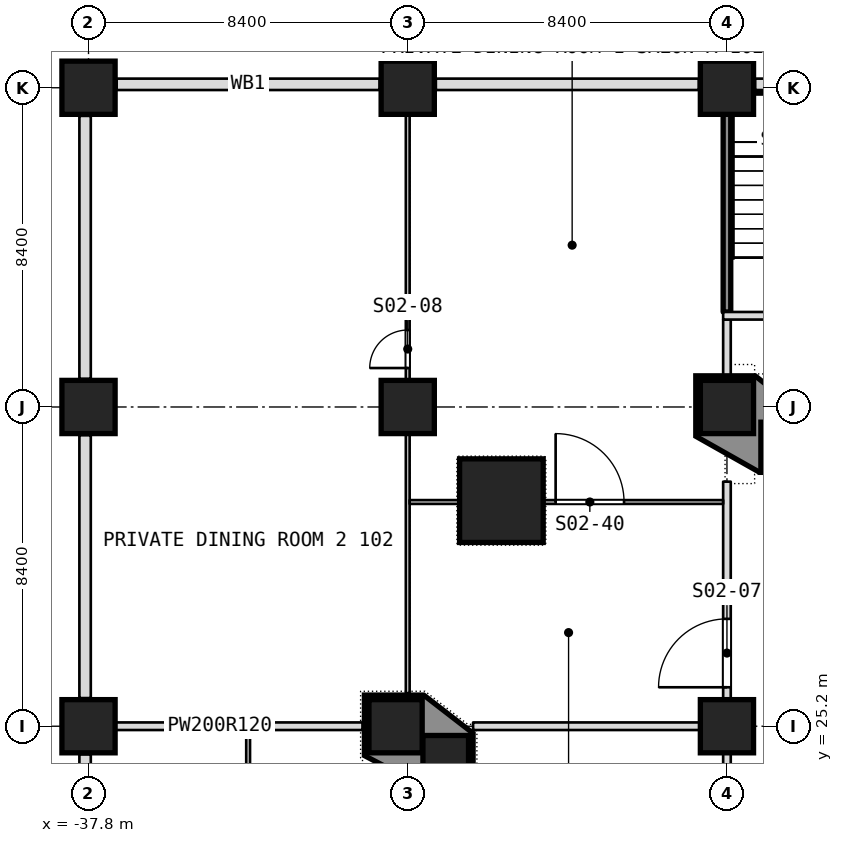
"""IFC4 building model, lengths in metres.
Left out: names, types, materials, properties, quantities, classifications, styles, units other than length and angle.
Written with IfcOpenShell. Run it as: python <this file> out.ifc"""

import sys

from ifc_helpers import new_model, si_unit, direction, frame, frame_2d, origin, origin_2d, place, context, subcontext, project, spatial, polyline, rectangle, outline, extrude, element, fill, save


model = new_model("IFC4")
c1 = context("Model", 3, precision=1e-05, world=origin(), true_north=direction((0.0, 1.0)))
c2 = subcontext(c1, "Body", "Model", "MODEL_VIEW")
j1 = project(units=[si_unit("LENGTHUNIT", "METRE"), si_unit("PLANEANGLEUNIT", "RADIAN")], contexts=[c1])
p1 = place(None, origin())
s1 = spatial("IfcSite", under=j1, at=p1, CompositionType="ELEMENT")
p2 = place(p1, origin())
s2 = spatial("IfcBuilding", under=s1, at=p2, CompositionType="ELEMENT")
p3 = place(p2, frame((0.0, 0.0, 8.0)))
s3 = spatial("IfcBuildingStorey", under=s2, at=p3, CompositionType="ELEMENT", Elevation=8.0)
for number, where, z_axis, x_axis in (
    (1, (-37.8, 25.2, 0.0), (0.0, 0.0, 1.0), (1.0, 0.0, 0.0)),
    (2, (-29.72, 25.2, 0.0), (0.0, 0.0, 1.0), (1.0, 0.0, 0.0)),
    (3, (-21.0, 25.2, 0.0), (0.0, 0.0, 1.0), (1.0, 0.0, 0.0)),
    (4, (-37.8, 33.6, 0.0), (0.0, 0.0, 1.0), (1.0, 0.0, 0.0)),
    (5, (-29.4, 33.6, 0.0), (0.0, 0.0, 1.0), (1.0, 0.0, 0.0)),
    (6, (-21.0, 33.6, 0.0), (0.0, 0.0, 1.0), (1.0, 0.0, 0.0)),
    (7, (-37.8, 42.0, 0.0), (0.0, 0.0, 1.0), (1.0, 0.0, 0.0)),
    (8, (-29.4, 42.0, 0.0), (0.0, 0.0, 1.0), (1.0, 0.0, 0.0)),
    (9, (-21.0, 42.0, 0.0), (0.0, 0.0, 1.0), (1.0, 0.0, 0.0)),
):
    element("IfcColumn", number, at=place(p3, frame(where, z_axis=z_axis, x_axis=x_axis)), inside=s3, PredefinedType="COLUMN", context=c2, shape_type="SweptSolid", body=[
        extrude(rectangle(XDim=1.4, YDim=1.4, at=origin_2d()), origin(), (0.0, 0.0, 1.0), 5.0),
    ])
p4 = place(p3, frame((-26.936, 31.135, 0.0), z_axis=(0.0, 0.0, 1.0), x_axis=(1.0, 0.0, 0.0)))
e10 = element("IfcColumn", 10, at=p4, inside=s3, PredefinedType="COLUMN", context=c2, shape_type="SweptSolid", body=[
    extrude(rectangle(XDim=2.2, YDim=2.2, at=origin_2d()), origin(), (0.0, 0.0, 1.0), 5.0),
])
for number, where, z_axis, x_axis in (
    (11, (-28.4, 24.356, 0.0), (0.0, 0.0, 1.0), (1.0, 0.0, 0.0)),
    (12, (-19.507, 32.6, 0.0), (0.0, 0.0, 1.0), (1.0, 0.0, 0.0)),
):
    element("IfcColumn", number, at=place(p3, frame(where, z_axis=z_axis, x_axis=x_axis)), inside=s3, PredefinedType="COLUMN", context=c2, shape_type="SweptSolid", body=[
        extrude(rectangle(XDim=1.2, YDim=1.2, at=origin_2d()), origin(), (0.0, 0.0, 1.0), 5.0),
    ])
p5 = place(p3, frame((-21.0, 9.5, 0.0), z_axis=(0.0, 0.0, 1.0), x_axis=(0.0, 1.0, 0.0)))
e13 = element("IfcWall", 13, at=p5, inside=s3, PredefinedType="PARTITIONING", context=c2, shape_type="SweptSolid", body=[
    extrude(rectangle(XDim=22.135, YDim=0.2, at=frame_2d((11.067, 0.0))), origin(), (0.0, 0.0, 1.0), 4.68),
])
p6 = place(p5, frame((8.325, 0.0, 0.0)))
e14 = element("IfcOpeningElement", 14, at=p6, cuts=e13, PredefinedType="OPENING", context=c2, shape_type="SweptSolid", body=[
    extrude(rectangle(XDim=1.8, YDim=2.1, at=frame_2d((0.9, 1.05))), frame((0.0, 0.1, 0.0), z_axis=(0.0, -1.0, 0.0), x_axis=(1.0, 0.0, 0.0)), (0.0, 0.0, 1.0), 0.2),
])
p7 = place(p5, frame((2.875, 0.0, 0.0)))
e15 = element("IfcOpeningElement", 15, at=p7, cuts=e13, PredefinedType="OPENING", context=c2, shape_type="SweptSolid", body=[
    extrude(rectangle(XDim=1.8, YDim=2.1, at=frame_2d((0.9, 1.05))), frame((0.0, 0.1, 0.0), z_axis=(0.0, -1.0, 0.0), x_axis=(1.0, 0.0, 0.0)), (0.0, 0.0, 1.0), 0.2),
])
p8 = place(p5, frame((16.725, 0.0, 0.0)))
e16 = element("IfcOpeningElement", 16, at=p8, cuts=e13, PredefinedType="OPENING", context=c2, shape_type="SweptSolid", body=[
    extrude(rectangle(XDim=1.8, YDim=2.1, at=frame_2d((0.9, 1.05))), frame((0.0, 0.1, 0.0), z_axis=(0.0, -1.0, 0.0), x_axis=(1.0, 0.0, 0.0)), (0.0, 0.0, 1.0), 0.2),
])
p9 = place(p3, frame((-21.0, 34.42, 0.0), z_axis=(0.0, 0.0, 1.0), x_axis=(0.0, 1.0, 0.0)))
e17 = element("IfcWall", 17, at=p9, inside=s3, PredefinedType="PARTITIONING", context=c2, shape_type="SweptSolid", body=[
    extrude(rectangle(XDim=1.48, YDim=0.2, at=frame_2d((0.74, 0.0))), origin(), (0.0, 0.0, 1.0), 4.68),
])
p10 = place(p3, frame((-21.0, 36.1, 0.0), z_axis=(0.0, 0.0, 1.0), x_axis=(0.0, 1.0, 0.0)))
e18 = element("IfcWall", 18, at=p10, inside=s3, PredefinedType="PARTITIONING", context=c2, shape_type="SweptSolid", body=[
    extrude(rectangle(XDim=6.2, YDim=0.2, at=frame_2d((3.1, 0.0))), origin(), (0.0, 0.0, 1.0), 4.68),
])
p11 = place(p3, frame((-38.1, 25.2, 0.0), z_axis=(0.0, 0.0, 1.0), x_axis=(1.0, 0.0, 0.0)))
e19 = element("IfcWall", 19, at=p11, inside=s3, PredefinedType="PARTITIONING", context=c2, shape_type="SweptSolid", body=[
    extrude(rectangle(XDim=7.51, YDim=0.2, at=frame_2d((3.755, 0.0))), origin(), (0.0, 0.0, 1.0), 4.68),
])
p12 = place(p3, frame((-27.68, 25.2, 0.0), z_axis=(0.0, 0.0, 1.0), x_axis=(1.0, 0.0, 0.0)))
e20 = element("IfcWall", 20, at=p12, inside=s3, PredefinedType="PARTITIONING", context=c2, shape_type="SweptSolid", body=[
    extrude(rectangle(XDim=6.58, YDim=0.2, at=frame_2d((3.29, 0.0))), origin(), (0.0, 0.0, 1.0), 4.68),
])
p13 = place(p3, frame((-29.4, 26.07, 0.0), z_axis=(0.0, 0.0, 1.0), x_axis=(0.0, 1.0, 0.0)))
e21 = element("IfcWall", 21, at=p13, inside=s3, PredefinedType="PARTITIONING", context=c2, shape_type="SweptSolid", body=[
    extrude(rectangle(XDim=16.23, YDim=0.1, at=frame_2d((8.115, 0.0))), origin(), (0.0, 0.0, 1.0), 4.68),
])
p14 = place(p13, frame((8.555, 0.0, 0.0)))
e22 = element("IfcOpeningElement", 22, at=p14, cuts=e21, PredefinedType="OPENING", context=c2, shape_type="SweptSolid", body=[
    extrude(rectangle(XDim=1.0, YDim=2.1, at=frame_2d((0.5, 1.05))), frame((0.0, 0.05, 0.0), z_axis=(0.0, -1.0, 0.0), x_axis=(1.0, 0.0, 0.0)), (0.0, 0.0, 1.0), 0.1),
])
p15 = place(p3, frame((-29.35, 31.1, 0.0), z_axis=(0.0, 0.0, 1.0), x_axis=(1.0, 0.0, 0.0)))
e23 = element("IfcWall", 23, at=p15, inside=s3, PredefinedType="PARTITIONING", context=c2, shape_type="SweptSolid", body=[
    extrude(rectangle(XDim=1.294, YDim=0.1, at=frame_2d((0.647, 0.0))), origin(), (0.0, 0.0, 1.0), 4.68),
])
p16 = place(p3, frame((-25.816, 31.1, 0.0), z_axis=(0.0, 0.0, 1.0), x_axis=(1.0, 0.0, 0.0)))
e24 = element("IfcWall", 24, at=p16, inside=s3, PredefinedType="PARTITIONING", context=c2, shape_type="SweptSolid", body=[
    extrude(rectangle(XDim=4.716, YDim=0.1, at=frame_2d((2.358, 0.0))), origin(), (0.0, 0.0, 1.0), 4.68),
])
p17 = place(p16, frame((0.308, 0.0, 0.0)))
e25 = element("IfcOpeningElement", 25, at=p17, cuts=e24, PredefinedType="OPENING", context=c2, shape_type="SweptSolid", body=[
    extrude(rectangle(XDim=1.8, YDim=2.1, at=frame_2d((0.9, 1.05))), frame((0.0, 0.05, 0.0), z_axis=(0.0, -1.0, 0.0), x_axis=(1.0, 0.0, 0.0)), (0.0, 0.0, 1.0), 0.1),
])
p18 = place(p3, frame((-33.6, 15.7, 0.0), z_axis=(0.0, 0.0, 1.0), x_axis=(0.0, 1.0, 0.0)))
e26 = element("IfcWall", 26, at=p18, inside=s3, PredefinedType="PARTITIONING", context=c2, shape_type="SweptSolid", body=[
    extrude(rectangle(XDim=9.4, YDim=0.1, at=frame_2d((4.7, 0.0))), origin(), (0.0, 0.0, 1.0), 4.68),
])
p19 = place(p18, frame((4.775, 0.0, 0.0)))
e27 = element("IfcOpeningElement", 27, at=p19, cuts=e26, PredefinedType="OPENING", context=c2, shape_type="SweptSolid", body=[
    extrude(rectangle(XDim=1.2, YDim=2.1, at=frame_2d((0.6, 1.05))), frame((0.0, 0.05, 0.0), z_axis=(0.0, -1.0, 0.0), x_axis=(1.0, 0.0, 0.0)), (0.0, 0.0, 1.0), 0.1),
])
p20 = place(p3, frame((-21.1, 36.0, 0.0), z_axis=(0.0, 0.0, 1.0), x_axis=(1.0, 0.0, 0.0)))
e28 = element("IfcWall", 28, at=p20, inside=s3, PredefinedType="PARTITIONING", context=c2, shape_type="SweptSolid", body=[
    extrude(rectangle(XDim=23.3, YDim=0.2, at=frame_2d((11.65, 0.0))), origin(), (0.0, 0.0, 1.0), 4.68),
])
p21 = place(p20, frame((1.6, 0.0, 0.0)))
e29 = element("IfcOpeningElement", 29, at=p21, cuts=e28, PredefinedType="OPENING", context=c2, shape_type="SweptSolid", body=[
    extrude(rectangle(XDim=1.2, YDim=2.1, at=frame_2d((0.6, 1.05))), frame((0.0, 0.1, 0.0), z_axis=(0.0, -1.0, 0.0), x_axis=(1.0, 0.0, 0.0)), (0.0, 0.0, 1.0), 0.2),
])
p22 = place(p20, frame((11.15, 0.0, 0.0)))
e30 = element("IfcOpeningElement", 30, at=p22, cuts=e28, PredefinedType="OPENING", context=c2, shape_type="SweptSolid", body=[
    extrude(rectangle(XDim=1.0, YDim=2.1, at=frame_2d((0.5, 1.05))), frame((0.0, 0.1, 0.0), z_axis=(0.0, -1.0, 0.0), x_axis=(1.0, 0.0, 0.0)), (0.0, 0.0, 1.0), 0.2),
])
p23 = place(p20, frame((10.05, 0.0, 0.0)))
e31 = element("IfcOpeningElement", 31, at=p23, cuts=e28, PredefinedType="OPENING", context=c2, shape_type="SweptSolid", body=[
    extrude(rectangle(XDim=1.0, YDim=2.1, at=frame_2d((0.5, 1.05))), frame((0.0, 0.1, 0.0), z_axis=(0.0, -1.0, 0.0), x_axis=(1.0, 0.0, 0.0)), (0.0, 0.0, 1.0), 0.2),
])
p24 = place(p20, frame((20.5, 0.0, 0.0)))
e32 = element("IfcOpeningElement", 32, at=p24, cuts=e28, PredefinedType="OPENING", context=c2, shape_type="SweptSolid", body=[
    extrude(rectangle(XDim=1.2, YDim=2.1, at=frame_2d((0.6, 1.05))), frame((0.0, 0.1, 0.0), z_axis=(0.0, -1.0, 0.0), x_axis=(1.0, 0.0, 0.0)), (0.0, 0.0, 1.0), 0.2),
])
for number, where, z_axis, x_axis in (
    (33, (-13.34, 42.09, 0.0), (0.0, 0.0, 1.0), (-1.0, 0.0, 0.0)),
    (34, (-21.74, 42.09, 0.0), (0.0, 0.0, 1.0), (-1.0, 0.0, 0.0)),
):
    element("IfcWall", number, at=place(p3, frame(where, z_axis=z_axis, x_axis=x_axis)), inside=s3, PredefinedType="NOTDEFINED", context=c2, shape_type="SweptSolid", body=[
        extrude(rectangle(XDim=6.92, YDim=0.3, at=frame_2d((3.46, 0.0))), origin(), (0.0, 0.0, 1.0), 3.78),
    ])
p25 = place(p3, frame((-30.14, 42.09, 0.0), z_axis=(0.0, 0.0, 1.0), x_axis=(-1.0, 0.0, 0.0)))
e35 = element("IfcWall", 35, at=p25, inside=s3, PredefinedType="NOTDEFINED", context=c2, shape_type="SweptSolid", body=[
    extrude(rectangle(XDim=6.92, YDim=0.3, at=frame_2d((3.46, 0.0))), origin(), (0.0, 0.0, 1.0), 3.78),
])
p26 = place(p3, frame((-37.89, 41.26, 0.0), z_axis=(0.0, 0.0, 1.0), x_axis=(0.0, -1.0, 0.0)))
e36 = element("IfcWall", 36, at=p26, inside=s3, PredefinedType="NOTDEFINED", context=c2, shape_type="SweptSolid", body=[
    extrude(rectangle(XDim=6.92, YDim=0.3, at=frame_2d((3.46, 0.0))), origin(), (0.0, 0.0, 1.0), 3.78),
])
p27 = place(p3, frame((-37.89, 32.86, 0.0), z_axis=(0.0, 0.0, 1.0), x_axis=(0.0, -1.0, 0.0)))
e37 = element("IfcWall", 37, at=p27, inside=s3, PredefinedType="NOTDEFINED", context=c2, shape_type="SweptSolid", body=[
    extrude(rectangle(XDim=6.92, YDim=0.3, at=frame_2d((3.46, 0.0))), origin(), (0.0, 0.0, 1.0), 3.78),
])
p28 = place(p3, frame((-37.89, 24.46, 0.0), z_axis=(0.0, 0.0, 1.0), x_axis=(0.0, -1.0, 0.0)))
e38 = element("IfcWall", 38, at=p28, inside=s3, PredefinedType="NOTDEFINED", context=c2, shape_type="SweptSolid", body=[
    extrude(rectangle(XDim=6.92, YDim=0.3, at=frame_2d((3.46, 0.0))), origin(), (0.0, 0.0, 1.0), 3.78),
])
p29 = place(p3, origin())
e39 = element("IfcWall", 39, at=p29, inside=s3, PredefinedType="SOLIDWALL", context=c2, shape_type="SweptSolid", body=[
    extrude(outline(polyline([(-30.54, 24.427), (-30.54, 26.02), (-28.979, 26.02), (-27.68, 25.015), (-27.68, 23.636), (-29.03, 23.636), (-30.54, 24.427)]), holes=[polyline([(-29.0, 23.756), (-27.8, 23.756), (-27.8, 24.956), (-29.0, 24.956), (-29.0, 23.756)]), polyline([(-30.42, 24.5), (-29.02, 24.5), (-29.02, 25.9), (-30.42, 25.9), (-30.42, 24.5)])]), origin(), (0.0, 0.0, 1.0), 5.0),
])
p30 = place(p3, origin())
e40 = element("IfcWall", 40, at=p30, inside=s3, PredefinedType="SOLIDWALL", context=c2, shape_type="SweptSolid", body=[
    extrude(outline(polyline([(-21.82, 34.42), (-20.258, 34.42), (-18.787, 33.258), (-18.787, 31.88), (-20.138, 31.88), (-21.82, 32.83), (-21.82, 34.42)]), holes=[polyline([(-18.907, 32.0), (-18.907, 33.2), (-20.107, 33.2), (-20.107, 32.0), (-18.907, 32.0)]), polyline([(-20.3, 32.9), (-20.3, 34.3), (-21.7, 34.3), (-21.7, 32.9), (-20.3, 32.9)])]), origin(), (0.0, 0.0, 1.0), 5.0),
])
p31 = place(p8, origin())
e41 = element("IfcDoor", 41, at=p31, inside=s3, OperationType="DOUBLE_DOOR_SINGLE_SWING", PredefinedType="DOOR", context=c2, shape_type="SweptSolid", body=[
    extrude(rectangle(XDim=1.8, YDim=2.1, at=frame_2d((0.9, 1.05))), frame((0.0, 0.025, 0.0), z_axis=(0.0, -1.0, 0.0), x_axis=(1.0, 0.0, 0.0)), (0.0, 0.0, 1.0), 0.05),
])
fill(e16, e41)
p32 = place(p14, origin())
e42 = element("IfcDoor", 42, at=p32, inside=s3, OperationType="SINGLE_SWING_LEFT", PredefinedType="DOOR", context=c2, shape_type="SweptSolid", body=[
    extrude(rectangle(XDim=1.0, YDim=2.1, at=frame_2d((0.5, 1.05))), frame((0.0, 0.025, 0.0), z_axis=(0.0, -1.0, 0.0), x_axis=(1.0, 0.0, 0.0)), (0.0, 0.0, 1.0), 0.05),
])
fill(e22, e42)
p33 = place(p17, origin())
e43 = element("IfcDoor", 43, at=p33, inside=s3, OperationType="DOUBLE_DOOR_SINGLE_SWING", PredefinedType="DOOR", context=c2, shape_type="SweptSolid", body=[
    extrude(rectangle(XDim=1.8, YDim=2.1, at=frame_2d((0.9, 1.05))), frame((0.0, 0.025, 0.0), z_axis=(0.0, -1.0, 0.0), x_axis=(1.0, 0.0, 0.0)), (0.0, 0.0, 1.0), 0.05),
])
fill(e25, e43)
save(model, sys.argv[1])
